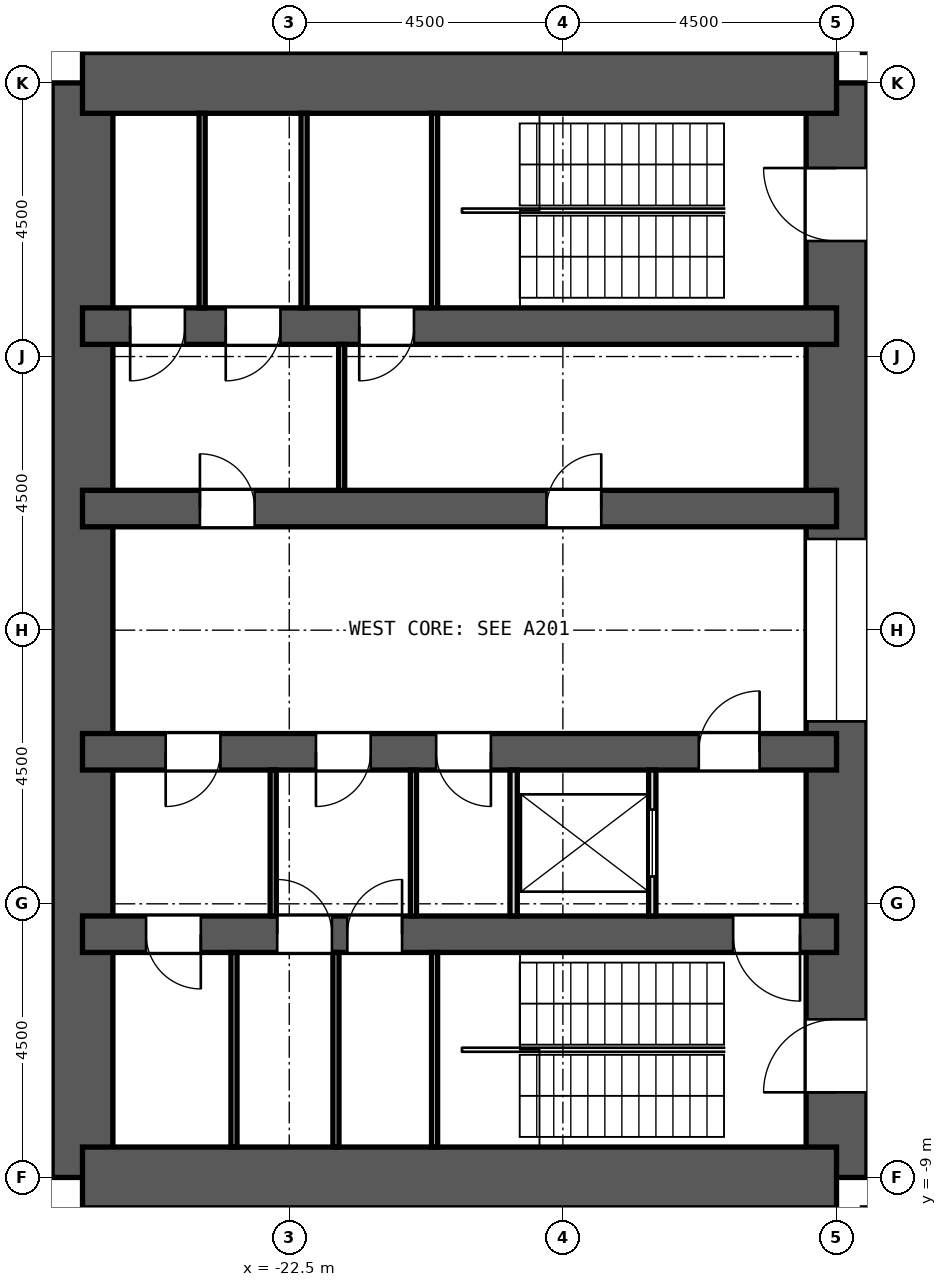
"""IFC4 building model, lengths in metres.
Left out: names, types, materials, properties, quantities, classifications, styles, units other than length and angle.
Written with IfcOpenShell. Run it as: python <this file> out.ifc"""

import sys

from ifc_helpers import new_model, si_unit, direction, frame, frame_2d, origin, place, context, subcontext, project, spatial, rectangle, extrude, element, fill, save


model = new_model("IFC4")
c1 = context("Model", 3, precision=1e-05, world=origin(), true_north=direction((0.0, 1.0)))
c2 = subcontext(c1, "Body", "Model", "MODEL_VIEW")
j1 = project(units=[si_unit("LENGTHUNIT", "METRE"), si_unit("PLANEANGLEUNIT", "RADIAN")], contexts=[c1])
p1 = place(None, origin())
s1 = spatial("IfcSite", under=j1, at=p1, CompositionType="ELEMENT")
p2 = place(p1, origin())
s2 = spatial("IfcBuilding", under=s1, at=p2, CompositionType="ELEMENT")
p3 = place(p2, frame((0.0, 0.0, -9.0)))
s3 = spatial("IfcBuildingStorey", under=s2, at=p3, CompositionType="ELEMENT", Elevation=-9.0)
p4 = place(p3, frame((-13.5, -9.0, -0.3), z_axis=(0.0, 0.0, 1.0), x_axis=(0.0, 1.0, 0.0)))
e1 = element("IfcWall", 1, at=p4, inside=s3, PredefinedType="SHEAR", context=c2, shape_type="SweptSolid", body=[
    extrude(rectangle(XDim=18.0, YDim=1.0, at=frame_2d((9.0, 0.0))), origin(), (0.0, 0.0, 1.0), 4.8),
])
p5 = place(p4, frame((15.4, 0.0, 0.3)))
e2 = element("IfcOpeningElement", 2, at=p5, cuts=e1, PredefinedType="OPENING", context=c2, shape_type="SweptSolid", body=[
    extrude(rectangle(XDim=1.2, YDim=2.1, at=frame_2d((0.6, 1.05))), frame((0.0, 0.512, 0.0), z_axis=(0.0, -1.0, 0.0), x_axis=(1.0, 0.0, 0.0)), (0.0, 0.0, 1.0), 1.024),
])
p6 = place(p4, frame((1.4, 0.0, 0.3)))
e3 = element("IfcOpeningElement", 3, at=p6, cuts=e1, PredefinedType="OPENING", context=c2, shape_type="SweptSolid", body=[
    extrude(rectangle(XDim=1.2, YDim=2.1, at=frame_2d((0.6, 1.05))), frame((0.0, 0.512, 0.0), z_axis=(0.0, -1.0, 0.0), x_axis=(1.0, 0.0, 0.0)), (0.0, 0.0, 1.0), 1.024),
])
p7 = place(p4, frame((7.5, 0.0, 0.3)))
e4 = element("IfcOpeningElement", 4, at=p7, cuts=e1, PredefinedType="OPENING", context=c2, shape_type="SweptSolid", body=[
    extrude(rectangle(XDim=3.0, YDim=2.4, at=frame_2d((1.5, 1.2))), frame((0.0, 0.512, 0.0), z_axis=(0.0, -1.0, 0.0), x_axis=(1.0, 0.0, 0.0)), (0.0, 0.0, 1.0), 1.024),
])
p8 = place(p3, frame((-25.9, -9.0, -0.3), z_axis=(0.0, 0.0, 1.0), x_axis=(0.0, 1.0, 0.0)))
e5 = element("IfcWall", 5, at=p8, inside=s3, PredefinedType="SHEAR", context=c2, shape_type="SweptSolid", body=[
    extrude(rectangle(XDim=18.0, YDim=1.0, at=frame_2d((9.0, 0.0))), origin(), (0.0, 0.0, 1.0), 4.8),
])
for number, where, z_axis, x_axis in (
    (6, (-13.5, 9.0, -0.3), (0.0, 0.0, 1.0), (-1.0, 0.0, 0.0)),
    (7, (-13.5, -9.0, -0.3), (0.0, 0.0, 1.0), (-1.0, 0.0, 0.0)),
):
    element("IfcWall", number, at=place(p3, frame(where, z_axis=z_axis, x_axis=x_axis)), inside=s3, PredefinedType="SHEAR", context=c2, shape_type="SweptSolid", body=[
        extrude(rectangle(XDim=12.4, YDim=1.0, at=frame_2d((6.2, 0.0))), origin(), (0.0, 0.0, 1.0), 4.8),
    ])
p9 = place(p3, frame((-13.5, 5.0, -0.3), z_axis=(0.0, 0.0, 1.0), x_axis=(-1.0, 0.0, 0.0)))
e8 = element("IfcWall", 8, at=p9, inside=s3, PredefinedType="SHEAR", context=c2, shape_type="SweptSolid", body=[
    extrude(rectangle(XDim=12.4, YDim=0.6, at=frame_2d((6.2, 0.0))), origin(), (0.0, 0.0, 1.0), 4.8),
])
p10 = place(p9, frame((6.949, 0.0, 0.3)))
e9 = element("IfcOpeningElement", 9, at=p10, cuts=e8, PredefinedType="OPENING", context=c2, shape_type="SweptSolid", body=[
    extrude(rectangle(XDim=0.9, YDim=2.1, at=frame_2d((0.45, 1.05))), frame((0.0, 0.312, 0.0), z_axis=(0.0, -1.0, 0.0), x_axis=(1.0, 0.0, 0.0)), (0.0, 0.0, 1.0), 0.624),
])
p11 = place(p9, frame((9.144, 0.0, 0.3)))
e10 = element("IfcOpeningElement", 10, at=p11, cuts=e8, PredefinedType="OPENING", context=c2, shape_type="SweptSolid", body=[
    extrude(rectangle(XDim=0.9, YDim=2.1, at=frame_2d((0.45, 1.05))), frame((0.0, 0.312, 0.0), z_axis=(0.0, -1.0, 0.0), x_axis=(1.0, 0.0, 0.0)), (0.0, 0.0, 1.0), 0.624),
])
p12 = place(p9, frame((10.716, 0.0, 0.3)))
e11 = element("IfcOpeningElement", 11, at=p12, cuts=e8, PredefinedType="OPENING", context=c2, shape_type="SweptSolid", body=[
    extrude(rectangle(XDim=0.9, YDim=2.1, at=frame_2d((0.45, 1.05))), frame((0.0, 0.312, 0.0), z_axis=(0.0, -1.0, 0.0), x_axis=(1.0, 0.0, 0.0)), (0.0, 0.0, 1.0), 0.624),
])
p13 = place(p3, frame((-13.5, -5.0, -0.3), z_axis=(0.0, 0.0, 1.0), x_axis=(-1.0, 0.0, 0.0)))
e12 = element("IfcWall", 12, at=p13, inside=s3, PredefinedType="SHEAR", context=c2, shape_type="SweptSolid", body=[
    extrude(rectangle(XDim=12.4, YDim=0.6, at=frame_2d((6.2, 0.0))), origin(), (0.0, 0.0, 1.0), 4.8),
])
p14 = place(p13, frame((7.145, 0.0, 0.3)))
e13 = element("IfcOpeningElement", 13, at=p14, cuts=e12, PredefinedType="OPENING", context=c2, shape_type="SweptSolid", body=[
    extrude(rectangle(XDim=0.9, YDim=2.1, at=frame_2d((0.45, 1.05))), frame((0.0, 0.312, 0.0), z_axis=(0.0, -1.0, 0.0), x_axis=(1.0, 0.0, 0.0)), (0.0, 0.0, 1.0), 0.624),
])
p15 = place(p13, frame((8.298, 0.0, 0.3)))
e14 = element("IfcOpeningElement", 14, at=p15, cuts=e12, PredefinedType="OPENING", context=c2, shape_type="SweptSolid", body=[
    extrude(rectangle(XDim=0.9, YDim=2.1, at=frame_2d((0.45, 1.05))), frame((0.0, 0.312, 0.0), z_axis=(0.0, -1.0, 0.0), x_axis=(1.0, 0.0, 0.0)), (0.0, 0.0, 1.0), 0.624),
])
p16 = place(p13, frame((10.454, 0.0, 0.3)))
e15 = element("IfcOpeningElement", 15, at=p16, cuts=e12, PredefinedType="OPENING", context=c2, shape_type="SweptSolid", body=[
    extrude(rectangle(XDim=0.9, YDim=2.1, at=frame_2d((0.45, 1.05))), frame((0.0, 0.312, 0.0), z_axis=(0.0, -1.0, 0.0), x_axis=(1.0, 0.0, 0.0)), (0.0, 0.0, 1.0), 0.624),
])
p17 = place(p13, frame((0.6, 0.0, 0.3)))
e16 = element("IfcOpeningElement", 16, at=p17, cuts=e12, PredefinedType="OPENING", context=c2, shape_type="SweptSolid", body=[
    extrude(rectangle(XDim=1.1, YDim=2.1, at=frame_2d((0.55, 1.05))), frame((0.0, 0.312, 0.0), z_axis=(0.0, -1.0, 0.0), x_axis=(1.0, 0.0, 0.0)), (0.0, 0.0, 1.0), 0.624),
])
p18 = place(p3, frame((-13.5, 2.0, -0.3), z_axis=(0.0, 0.0, 1.0), x_axis=(-1.0, 0.0, 0.0)))
e17 = element("IfcWall", 17, at=p18, inside=s3, PredefinedType="SHEAR", context=c2, shape_type="SweptSolid", body=[
    extrude(rectangle(XDim=12.4, YDim=0.6, at=frame_2d((6.2, 0.0))), origin(), (0.0, 0.0, 1.0), 4.8),
])
p19 = place(p18, frame((3.869, 0.0, 0.3)))
e18 = element("IfcOpeningElement", 18, at=p19, cuts=e17, PredefinedType="OPENING", context=c2, shape_type="SweptSolid", body=[
    extrude(rectangle(XDim=0.9, YDim=2.1, at=frame_2d((0.45, 1.05))), frame((0.0, 0.312, 0.0), z_axis=(0.0, -1.0, 0.0), x_axis=(1.0, 0.0, 0.0)), (0.0, 0.0, 1.0), 0.624),
])
p20 = place(p18, frame((9.569, 0.0, 0.3)))
e19 = element("IfcOpeningElement", 19, at=p20, cuts=e17, PredefinedType="OPENING", context=c2, shape_type="SweptSolid", body=[
    extrude(rectangle(XDim=0.9, YDim=2.1, at=frame_2d((0.45, 1.05))), frame((0.0, 0.312, 0.0), z_axis=(0.0, -1.0, 0.0), x_axis=(1.0, 0.0, 0.0)), (0.0, 0.0, 1.0), 0.624),
])
p21 = place(p3, frame((-13.5, -2.0, -0.3), z_axis=(0.0, 0.0, 1.0), x_axis=(-1.0, 0.0, 0.0)))
e20 = element("IfcWall", 20, at=p21, inside=s3, PredefinedType="SHEAR", context=c2, shape_type="SweptSolid", body=[
    extrude(rectangle(XDim=12.4, YDim=0.6, at=frame_2d((6.2, 0.0))), origin(), (0.0, 0.0, 1.0), 4.8),
])
p22 = place(p21, frame((1.265, 0.0, 0.3)))
e21 = element("IfcOpeningElement", 21, at=p22, cuts=e20, PredefinedType="OPENING", context=c2, shape_type="SweptSolid", body=[
    extrude(rectangle(XDim=1.0, YDim=2.1, at=frame_2d((0.5, 1.05))), frame((0.0, 0.312, 0.0), z_axis=(0.0, -1.0, 0.0), x_axis=(1.0, 0.0, 0.0)), (0.0, 0.0, 1.0), 0.624),
])
p23 = place(p21, frame((5.684, 0.0, 0.3)))
e22 = element("IfcOpeningElement", 22, at=p23, cuts=e20, PredefinedType="OPENING", context=c2, shape_type="SweptSolid", body=[
    extrude(rectangle(XDim=0.9, YDim=2.1, at=frame_2d((0.45, 1.05))), frame((0.0, 0.312, 0.0), z_axis=(0.0, -1.0, 0.0), x_axis=(1.0, 0.0, 0.0)), (0.0, 0.0, 1.0), 0.624),
])
p24 = place(p21, frame((7.661, 0.0, 0.3)))
e23 = element("IfcOpeningElement", 23, at=p24, cuts=e20, PredefinedType="OPENING", context=c2, shape_type="SweptSolid", body=[
    extrude(rectangle(XDim=0.9, YDim=2.1, at=frame_2d((0.45, 1.05))), frame((0.0, 0.312, 0.0), z_axis=(0.0, -1.0, 0.0), x_axis=(1.0, 0.0, 0.0)), (0.0, 0.0, 1.0), 0.624),
])
p25 = place(p21, frame((10.132, 0.0, 0.3)))
e24 = element("IfcOpeningElement", 24, at=p25, cuts=e20, PredefinedType="OPENING", context=c2, shape_type="SweptSolid", body=[
    extrude(rectangle(XDim=0.9, YDim=2.1, at=frame_2d((0.45, 1.05))), frame((0.0, 0.312, 0.0), z_axis=(0.0, -1.0, 0.0), x_axis=(1.0, 0.0, 0.0)), (0.0, 0.0, 1.0), 0.624),
])
p26 = place(p3, frame((-19.474, 19.474, 0.0), z_axis=(0.0, 0.0, 1.0), x_axis=(0.707106781187, -0.707106781187, 0.0)))
e25 = element("IfcWall", 25, at=p26, inside=s3, PredefinedType="PARTITIONING", context=c2, shape_type="SweptSolid", body=[
    extrude(rectangle(XDim=14.703, YDim=0.15, at=frame_2d((7.352, 0.0))), origin(), (0.0, 0.0, 1.0), 3.95),
])
p27 = place(p26, frame((11.427, 0.0, 0.0)))
e26 = element("IfcOpeningElement", 26, at=p27, cuts=e25, PredefinedType="OPENING", context=c2, shape_type="SweptSolid", body=[
    extrude(rectangle(XDim=1.0, YDim=2.1, at=frame_2d((0.5, 1.05))), frame((0.0, 0.087, 0.0), z_axis=(0.0, -1.0, 0.0), x_axis=(1.0, 0.0, 0.0)), (0.0, 0.0, 1.0), 0.174),
])
p28 = place(p3, frame((-19.474, -19.474, 0.0), z_axis=(0.0, 0.0, 1.0), x_axis=(0.707106781187, 0.707106781187, 0.0)))
e27 = element("IfcWall", 27, at=p28, inside=s3, PredefinedType="PARTITIONING", context=c2, shape_type="SweptSolid", body=[
    extrude(rectangle(XDim=14.628, YDim=0.15, at=frame_2d((7.314, 0.0))), origin(), (0.0, 0.0, 1.0), 3.95),
])
p29 = place(p28, frame((11.427, 0.0, 0.0)))
e28 = element("IfcOpeningElement", 28, at=p29, cuts=e27, PredefinedType="OPENING", context=c2, shape_type="SweptSolid", body=[
    extrude(rectangle(XDim=1.0, YDim=2.1, at=frame_2d((0.5, 1.05))), frame((0.0, 0.087, 0.0), z_axis=(0.0, -1.0, 0.0), x_axis=(1.0, 0.0, 0.0)), (0.0, 0.0, 1.0), 0.174),
])
p30 = place(p3, frame((-13.0, 9.5, 0.0), z_axis=(0.0, 0.0, 1.0), x_axis=(0.0, 1.0, 0.0)))
e29 = element("IfcWall", 29, at=p30, inside=s3, PredefinedType="PARTITIONING", context=c2, shape_type="SweptSolid", body=[
    extrude(rectangle(XDim=3.425, YDim=0.15, at=frame_2d((1.712, 0.0))), origin(), (0.0, 0.0, 1.0), 3.95),
])
p31 = place(p30, frame((1.15, 0.0, 0.0)))
e30 = element("IfcOpeningElement", 30, at=p31, cuts=e29, PredefinedType="OPENING", context=c2, shape_type="SweptSolid", body=[
    extrude(rectangle(XDim=1.2, YDim=2.1, at=frame_2d((0.6, 1.05))), frame((0.0, 0.087, 0.0), z_axis=(0.0, -1.0, 0.0), x_axis=(1.0, 0.0, 0.0)), (0.0, 0.0, 1.0), 0.174),
])
p32 = place(p3, frame((-21.638, 2.3, 0.0), z_axis=(0.0, 0.0, 1.0), x_axis=(0.0, 1.0, 0.0)))
e31 = element("IfcWall", 31, at=p32, inside=s3, PredefinedType="PARTITIONING", context=c2, shape_type="SweptSolid", body=[
    extrude(rectangle(XDim=2.4, YDim=0.1, at=frame_2d((1.2, 0.0))), origin(), (0.0, 0.0, 1.0), 3.95),
])
p33 = place(p3, frame((-16.53, -4.7, 0.0), z_axis=(0.0, 0.0, 1.0), x_axis=(0.0, 1.0, 0.0)))
e32 = element("IfcWall", 32, at=p33, inside=s3, PredefinedType="PARTITIONING", context=c2, shape_type="SweptSolid", body=[
    extrude(rectangle(XDim=2.4, YDim=0.12, at=frame_2d((1.2, 0.0))), origin(), (0.0, 0.0, 1.0), 3.95),
])
p34 = place(p33, frame((0.65, 0.0, 0.0)))
e33 = element("IfcOpeningElement", 33, at=p34, cuts=e32, PredefinedType="OPENING", context=c2, shape_type="SweptSolid", body=[
    extrude(rectangle(XDim=1.1, YDim=2.1, at=frame_2d((0.55, 1.05))), frame((0.0, 0.072, 0.0), z_axis=(0.0, -1.0, 0.0), x_axis=(1.0, 0.0, 0.0)), (0.0, 0.0, 1.0), 0.144),
])
p35 = place(p3, frame((-18.81, -4.7, 0.0), z_axis=(0.0, 0.0, 1.0), x_axis=(0.0, 1.0, 0.0)))
e34 = element("IfcWall", 34, at=p35, inside=s3, PredefinedType="PARTITIONING", context=c2, shape_type="SweptSolid", body=[
    extrude(rectangle(XDim=2.4, YDim=0.12, at=frame_2d((1.2, 0.0))), origin(), (0.0, 0.0, 1.0), 3.95),
])
for number, where, z_axis, x_axis in (
    (35, (-20.458, -4.7, 0.0), (0.0, 0.0, 1.0), (0.0, 1.0, 0.0)),
    (36, (-22.764, -4.7, 0.0), (0.0, 0.0, 1.0), (0.0, 1.0, 0.0)),
):
    element("IfcWall", number, at=place(p3, frame(where, z_axis=z_axis, x_axis=x_axis)), inside=s3, PredefinedType="PARTITIONING", context=c2, shape_type="SweptSolid", body=[
        extrude(rectangle(XDim=2.4, YDim=0.1, at=frame_2d((1.2, 0.0))), origin(), (0.0, 0.0, 1.0), 3.95),
    ])
for number, where, z_axis, x_axis in (
    (37, (-20.11, 5.3, 0.0), (0.0, 0.0, 1.0), (0.0, 1.0, 0.0)),
    (38, (-22.256, 5.3, 0.0), (0.0, 0.0, 1.0), (0.0, 1.0, 0.0)),
    (39, (-23.933, 5.3, 0.0), (0.0, 0.0, 1.0), (0.0, 1.0, 0.0)),
    (40, (-20.11, -8.5, 0.0), (0.0, 0.0, 1.0), (0.0, 1.0, 0.0)),
    (41, (-21.732, -8.5, 0.0), (0.0, 0.0, 1.0), (0.0, 1.0, 0.0)),
    (42, (-23.409, -8.5, 0.0), (0.0, 0.0, 1.0), (0.0, 1.0, 0.0)),
):
    element("IfcWall", number, at=place(p3, frame(where, z_axis=z_axis, x_axis=x_axis)), inside=s3, PredefinedType="PARTITIONING", context=c2, shape_type="SweptSolid", body=[
        extrude(rectangle(XDim=3.2, YDim=0.1, at=frame_2d((1.6, 0.0))), origin(), (0.0, 0.0, 1.0), 3.95),
    ])
p36 = place(p34, origin())
e43 = element("IfcDoor", 43, at=p36, inside=s3, OperationType="DOUBLE_DOOR_SLIDING", PredefinedType="DOOR", context=c2, shape_type="SweptSolid", body=[
    extrude(rectangle(XDim=1.1, YDim=2.1, at=frame_2d((0.55, 1.05))), frame((0.0, 0.025, 0.0), z_axis=(0.0, -1.0, 0.0), x_axis=(1.0, 0.0, 0.0)), (0.0, 0.0, 1.0), 0.05),
])
fill(e33, e43)
p37 = place(p19, frame((0.9, 0.0, 0.0), z_axis=(0.0, 0.0, 1.0), x_axis=(-1.0, 0.0, 0.0)))
e44 = element("IfcDoor", 44, at=p37, inside=s3, OperationType="SINGLE_SWING_RIGHT", PredefinedType="DOOR", context=c2, shape_type="SweptSolid", body=[
    extrude(rectangle(XDim=0.9, YDim=2.1, at=frame_2d((0.45, 1.05))), frame((0.0, 0.025, 0.0), z_axis=(0.0, -1.0, 0.0), x_axis=(1.0, 0.0, 0.0)), (0.0, 0.0, 1.0), 0.05),
])
fill(e18, e44)
p38 = place(p20, frame((0.9, 0.0, 0.0), z_axis=(0.0, 0.0, 1.0), x_axis=(-1.0, 0.0, 0.0)))
e45 = element("IfcDoor", 45, at=p38, inside=s3, OperationType="SINGLE_SWING_LEFT", PredefinedType="DOOR", context=c2, shape_type="SweptSolid", body=[
    extrude(rectangle(XDim=0.9, YDim=2.1, at=frame_2d((0.45, 1.05))), frame((0.0, 0.025, 0.0), z_axis=(0.0, -1.0, 0.0), x_axis=(1.0, 0.0, 0.0)), (0.0, 0.0, 1.0), 0.05),
])
fill(e19, e45)
p39 = place(p22, frame((1.0, 0.0, 0.0), z_axis=(0.0, 0.0, 1.0), x_axis=(-1.0, 0.0, 0.0)))
e46 = element("IfcDoor", 46, at=p39, inside=s3, OperationType="SINGLE_SWING_RIGHT", PredefinedType="DOOR", context=c2, shape_type="SweptSolid", body=[
    extrude(rectangle(XDim=1.0, YDim=2.1, at=frame_2d((0.5, 1.05))), frame((0.0, 0.025, 0.0), z_axis=(0.0, -1.0, 0.0), x_axis=(1.0, 0.0, 0.0)), (0.0, 0.0, 1.0), 0.05),
])
fill(e21, e46)
p40 = place(p23, origin())
e47 = element("IfcDoor", 47, at=p40, inside=s3, OperationType="SINGLE_SWING_LEFT", PredefinedType="DOOR", context=c2, shape_type="SweptSolid", body=[
    extrude(rectangle(XDim=0.9, YDim=2.1, at=frame_2d((0.45, 1.05))), frame((0.0, 0.025, 0.0), z_axis=(0.0, -1.0, 0.0), x_axis=(1.0, 0.0, 0.0)), (0.0, 0.0, 1.0), 0.05),
])
fill(e22, e47)
p41 = place(p24, origin())
e48 = element("IfcDoor", 48, at=p41, inside=s3, OperationType="SINGLE_SWING_RIGHT", PredefinedType="DOOR", context=c2, shape_type="SweptSolid", body=[
    extrude(rectangle(XDim=0.9, YDim=2.1, at=frame_2d((0.45, 1.05))), frame((0.0, 0.025, 0.0), z_axis=(0.0, -1.0, 0.0), x_axis=(1.0, 0.0, 0.0)), (0.0, 0.0, 1.0), 0.05),
])
fill(e23, e48)
p42 = place(p25, origin())
e49 = element("IfcDoor", 49, at=p42, inside=s3, OperationType="SINGLE_SWING_RIGHT", PredefinedType="DOOR", context=c2, shape_type="SweptSolid", body=[
    extrude(rectangle(XDim=0.9, YDim=2.1, at=frame_2d((0.45, 1.05))), frame((0.0, 0.025, 0.0), z_axis=(0.0, -1.0, 0.0), x_axis=(1.0, 0.0, 0.0)), (0.0, 0.0, 1.0), 0.05),
])
fill(e24, e49)
p43 = place(p10, origin())
e50 = element("IfcDoor", 50, at=p43, inside=s3, OperationType="SINGLE_SWING_RIGHT", PredefinedType="DOOR", context=c2, shape_type="SweptSolid", body=[
    extrude(rectangle(XDim=0.9, YDim=2.1, at=frame_2d((0.45, 1.05))), frame((0.0, 0.025, 0.0), z_axis=(0.0, -1.0, 0.0), x_axis=(1.0, 0.0, 0.0)), (0.0, 0.0, 1.0), 0.05),
])
fill(e9, e50)
p44 = place(p11, origin())
e51 = element("IfcDoor", 51, at=p44, inside=s3, OperationType="SINGLE_SWING_RIGHT", PredefinedType="DOOR", context=c2, shape_type="SweptSolid", body=[
    extrude(rectangle(XDim=0.9, YDim=2.1, at=frame_2d((0.45, 1.05))), frame((0.0, 0.025, 0.0), z_axis=(0.0, -1.0, 0.0), x_axis=(1.0, 0.0, 0.0)), (0.0, 0.0, 1.0), 0.05),
])
fill(e10, e51)
p45 = place(p12, origin())
e52 = element("IfcDoor", 52, at=p45, inside=s3, OperationType="SINGLE_SWING_RIGHT", PredefinedType="DOOR", context=c2, shape_type="SweptSolid", body=[
    extrude(rectangle(XDim=0.9, YDim=2.1, at=frame_2d((0.45, 1.05))), frame((0.0, 0.025, 0.0), z_axis=(0.0, -1.0, 0.0), x_axis=(1.0, 0.0, 0.0)), (0.0, 0.0, 1.0), 0.05),
])
fill(e11, e52)
p46 = place(p14, frame((0.9, 0.0, 0.0), z_axis=(0.0, 0.0, 1.0), x_axis=(-1.0, 0.0, 0.0)))
e53 = element("IfcDoor", 53, at=p46, inside=s3, OperationType="SINGLE_SWING_RIGHT", PredefinedType="DOOR", context=c2, shape_type="SweptSolid", body=[
    extrude(rectangle(XDim=0.9, YDim=2.1, at=frame_2d((0.45, 1.05))), frame((0.0, 0.025, 0.0), z_axis=(0.0, -1.0, 0.0), x_axis=(1.0, 0.0, 0.0)), (0.0, 0.0, 1.0), 0.05),
])
fill(e13, e53)
p47 = place(p15, frame((0.9, 0.0, 0.0), z_axis=(0.0, 0.0, 1.0), x_axis=(-1.0, 0.0, 0.0)))
e54 = element("IfcDoor", 54, at=p47, inside=s3, OperationType="SINGLE_SWING_LEFT", PredefinedType="DOOR", context=c2, shape_type="SweptSolid", body=[
    extrude(rectangle(XDim=0.9, YDim=2.1, at=frame_2d((0.45, 1.05))), frame((0.0, 0.025, 0.0), z_axis=(0.0, -1.0, 0.0), x_axis=(1.0, 0.0, 0.0)), (0.0, 0.0, 1.0), 0.05),
])
fill(e14, e54)
p48 = place(p16, origin())
e55 = element("IfcDoor", 55, at=p48, inside=s3, OperationType="SINGLE_SWING_LEFT", PredefinedType="DOOR", context=c2, shape_type="SweptSolid", body=[
    extrude(rectangle(XDim=0.9, YDim=2.1, at=frame_2d((0.45, 1.05))), frame((0.0, 0.025, 0.0), z_axis=(0.0, -1.0, 0.0), x_axis=(1.0, 0.0, 0.0)), (0.0, 0.0, 1.0), 0.05),
])
fill(e15, e55)
p49 = place(p17, origin())
e56 = element("IfcDoor", 56, at=p49, inside=s3, OperationType="SINGLE_SWING_LEFT", PredefinedType="DOOR", context=c2, shape_type="SweptSolid", body=[
    extrude(rectangle(XDim=1.1, YDim=2.1, at=frame_2d((0.55, 1.05))), frame((0.0, 0.025, 0.0), z_axis=(0.0, -1.0, 0.0), x_axis=(1.0, 0.0, 0.0)), (0.0, 0.0, 1.0), 0.05),
])
fill(e16, e56)
p50 = place(p5, origin())
e57 = element("IfcDoor", 57, at=p50, inside=s3, OperationType="SINGLE_SWING_RIGHT", PredefinedType="DOOR", context=c2, shape_type="SweptSolid", body=[
    extrude(rectangle(XDim=1.2, YDim=2.1, at=frame_2d((0.6, 1.05))), frame((0.0, 0.025, 0.0), z_axis=(0.0, -1.0, 0.0), x_axis=(1.0, 0.0, 0.0)), (0.0, 0.0, 1.0), 0.05),
])
fill(e2, e57)
p51 = place(p6, origin())
e58 = element("IfcDoor", 58, at=p51, inside=s3, OperationType="SINGLE_SWING_LEFT", PredefinedType="DOOR", context=c2, shape_type="SweptSolid", body=[
    extrude(rectangle(XDim=1.2, YDim=2.1, at=frame_2d((0.6, 1.05))), frame((0.0, 0.025, 0.0), z_axis=(0.0, -1.0, 0.0), x_axis=(1.0, 0.0, 0.0)), (0.0, 0.0, 1.0), 0.05),
])
fill(e3, e58)
p52 = place(p7, origin())
e59 = element("IfcDoor", 59, at=p52, inside=s3, OperationType="DOUBLE_DOOR_SLIDING", PredefinedType="DOOR", context=c2, shape_type="SweptSolid", body=[
    extrude(rectangle(XDim=3.0, YDim=2.4, at=frame_2d((1.5, 1.2))), frame((0.0, 0.025, 0.0), z_axis=(0.0, -1.0, 0.0), x_axis=(1.0, 0.0, 0.0)), (0.0, 0.0, 1.0), 0.05),
])
fill(e4, e59)
save(model, sys.argv[1])
